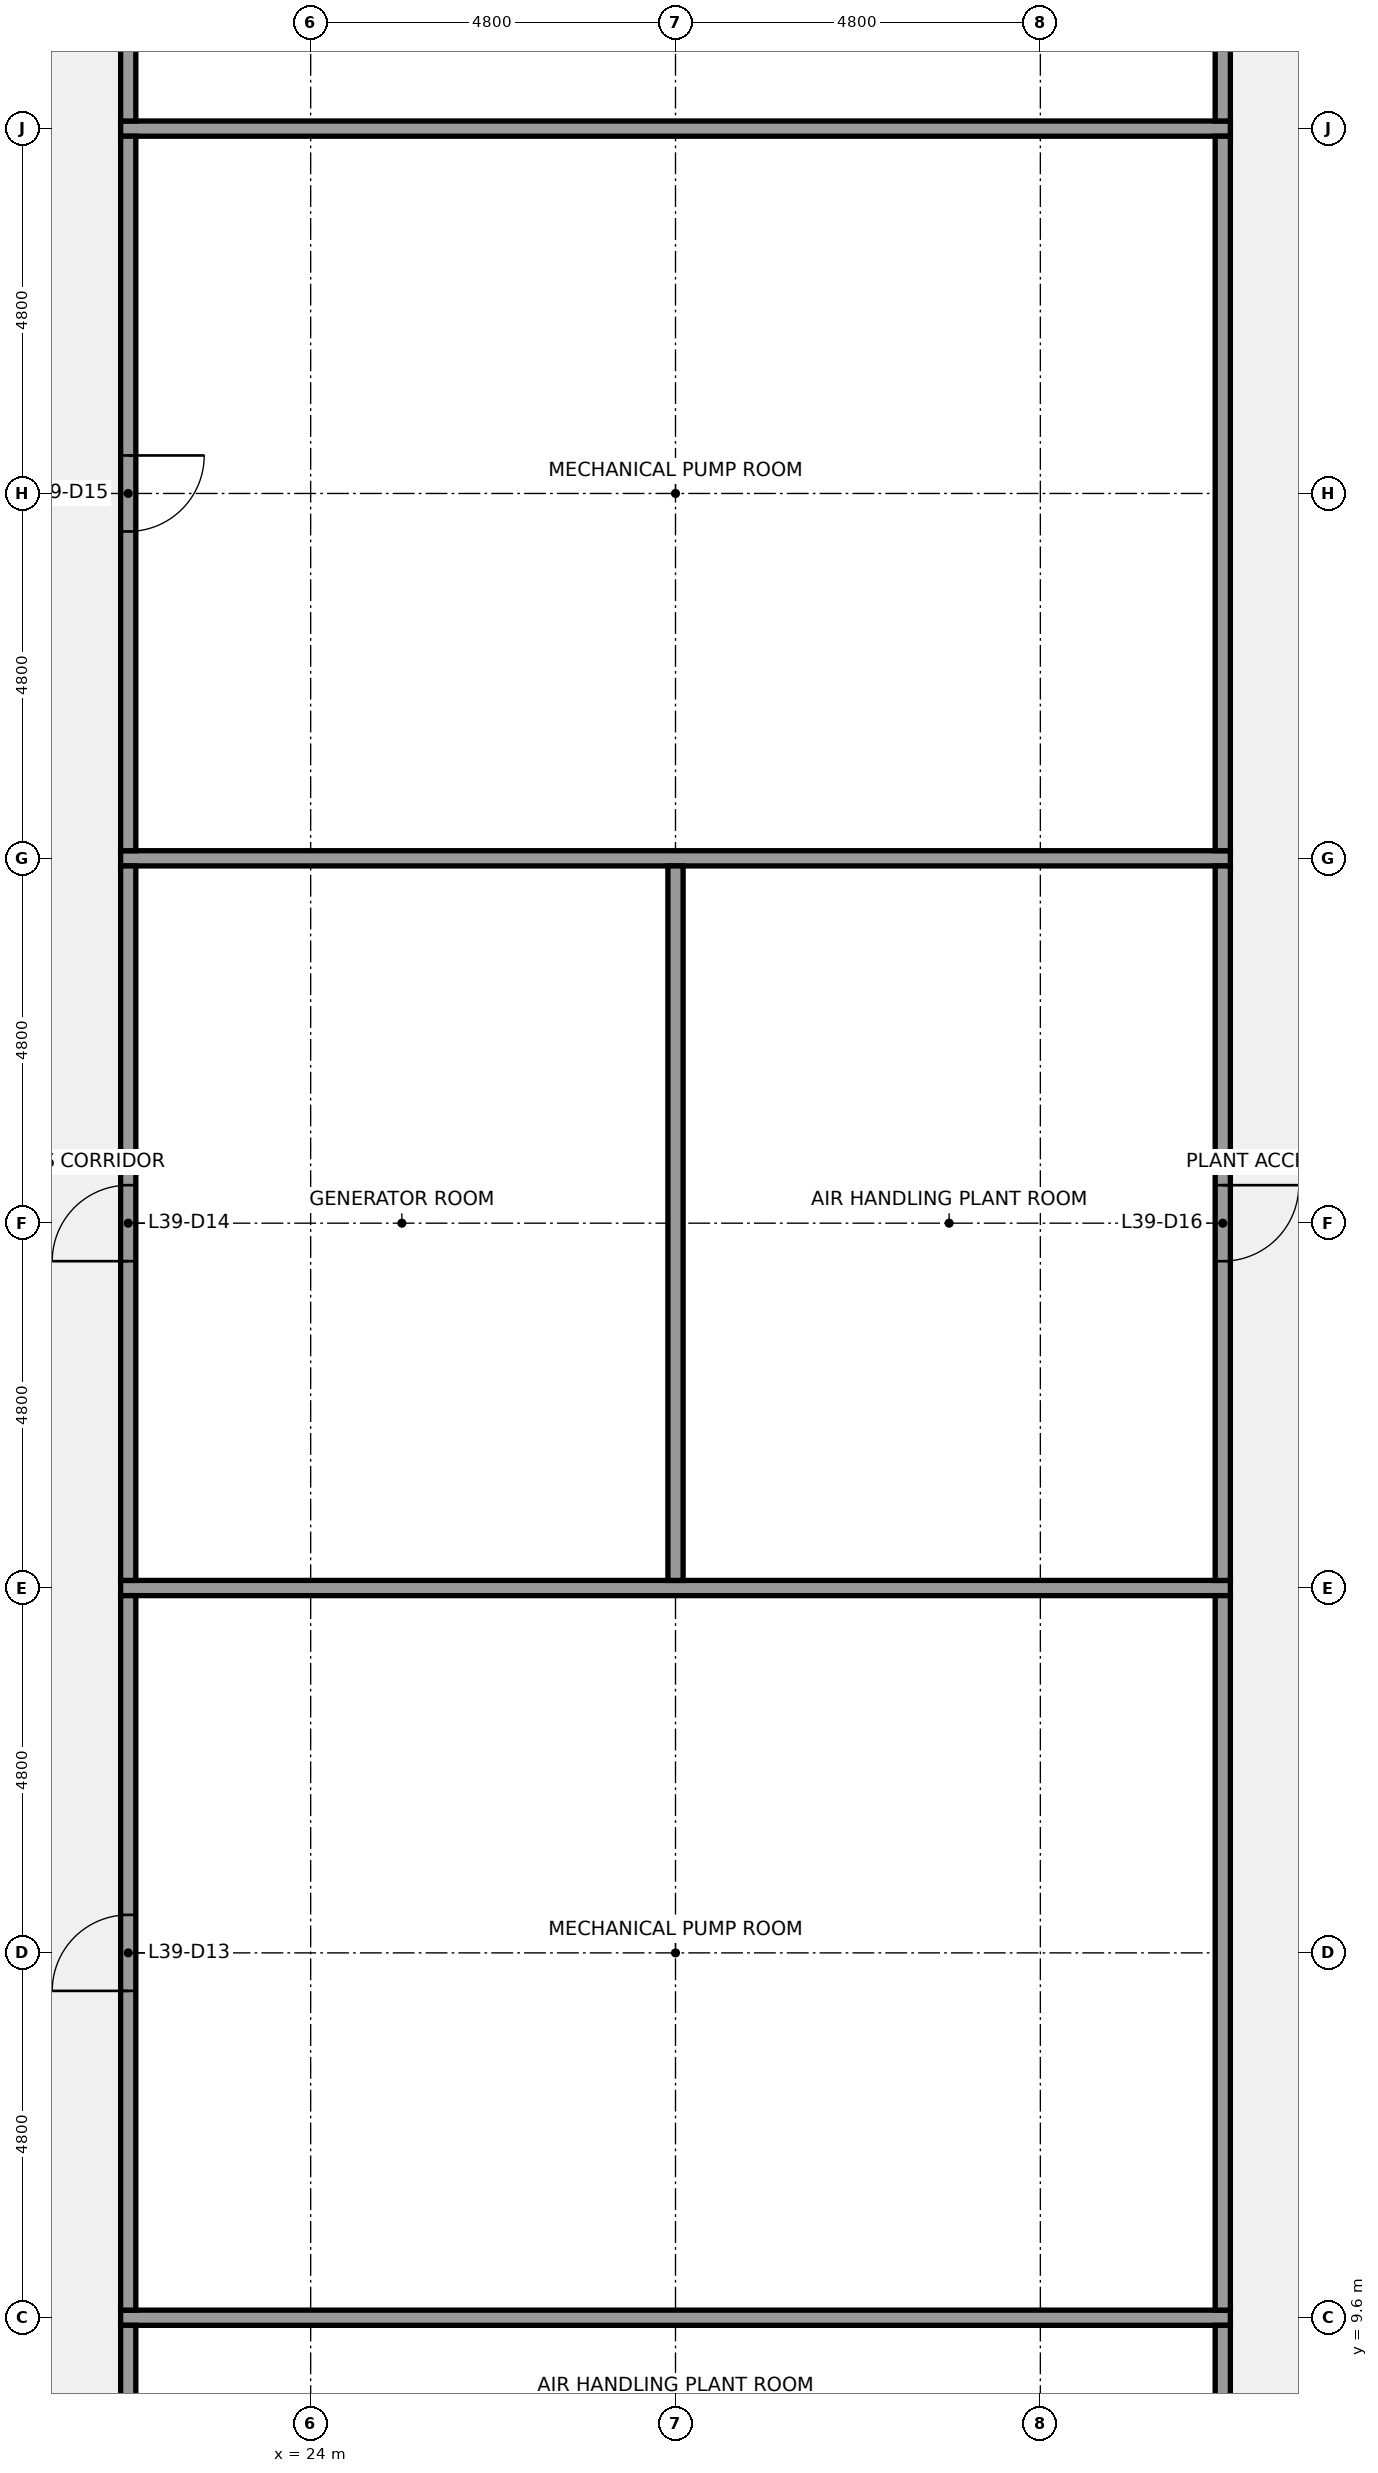
"""IFC4 building model, lengths in metres.
Left out: names, types, materials, properties, quantities, classifications, styles, units other than length and angle.
Written with IfcOpenShell. Run it as: python <this file> out.ifc"""

import sys

from ifc_helpers import new_model, si_unit, direction, frame, frame_2d, origin, place, context, subcontext, project, spatial, rectangle, extrude, element, fill, save


model = new_model("IFC4")
c1 = context("Model", 3, precision=1e-05, world=origin(), true_north=direction((0.0, 1.0)))
c2 = subcontext(c1, "Body", "Model", "MODEL_VIEW")
j1 = project(units=[si_unit("LENGTHUNIT", "METRE"), si_unit("PLANEANGLEUNIT", "RADIAN")], contexts=[c1])
p1 = place(None, origin())
s1 = spatial("IfcSite", under=j1, at=p1, CompositionType="ELEMENT")
p2 = place(p1, origin())
s2 = spatial("IfcBuilding", under=s1, at=p2, CompositionType="ELEMENT")
p3 = place(p2, frame((0.0, 0.0, 176.1)))
s3 = spatial("IfcBuildingStorey", under=s2, at=p3, CompositionType="ELEMENT", Elevation=176.1)
for number, where, z_axis, x_axis in (
    (1, (21.5, 9.6, 0.0), (0.0, 0.0, 1.0), (1.0, 0.0, 0.0)),
    (2, (21.5, 19.2, 0.0), (0.0, 0.0, 1.0), (1.0, 0.0, 0.0)),
    (3, (21.5, 28.8, 0.0), (0.0, 0.0, 1.0), (1.0, 0.0, 0.0)),
    (4, (21.5, 38.4, 0.0), (0.0, 0.0, 1.0), (1.0, 0.0, 0.0)),
):
    element("IfcWall", number, at=place(p3, frame(where, z_axis=z_axis, x_axis=x_axis)), inside=s3, PredefinedType="PARTITIONING", context=c2, shape_type="SweptSolid", body=[
        extrude(rectangle(XDim=14.6, YDim=0.2, at=frame_2d((7.3, 0.0))), origin(), (0.0, 0.0, 1.0), 2.992),
    ])
p4 = place(p3, frame((21.6, 7.3, 0.0), z_axis=(0.0, 0.0, 1.0), x_axis=(0.0, 1.0, 0.0)))
e5 = element("IfcWall", 5, at=p4, inside=s3, PredefinedType="PARTITIONING", context=c2, shape_type="SweptSolid", body=[
    extrude(rectangle(XDim=2.2, YDim=0.2, at=frame_2d((1.1, 0.0))), origin(), (0.0, 0.0, 1.0), 2.992),
])
p5 = place(p3, frame((21.6, 9.7, 0.0), z_axis=(0.0, 0.0, 1.0), x_axis=(0.0, 1.0, 0.0)))
e6 = element("IfcWall", 6, at=p5, inside=s3, PredefinedType="PARTITIONING", context=c2, shape_type="SweptSolid", body=[
    extrude(rectangle(XDim=9.4, YDim=0.2, at=frame_2d((4.7, 0.0))), origin(), (0.0, 0.0, 1.0), 2.992),
])
p6 = place(p5, frame((4.2, 0.0, 0.0)))
e7 = element("IfcOpeningElement", 7, at=p6, cuts=e6, PredefinedType="OPENING", context=c2, shape_type="SweptSolid", body=[
    extrude(rectangle(XDim=1.0, YDim=2.1, at=frame_2d((0.5, 1.05))), frame((0.0, 0.11, 0.0), z_axis=(0.0, -1.0, 0.0), x_axis=(1.0, 0.0, 0.0)), (0.0, 0.0, 1.0), 0.22),
])
p7 = place(p3, frame((21.6, 19.3, 0.0), z_axis=(0.0, 0.0, 1.0), x_axis=(0.0, 1.0, 0.0)))
e8 = element("IfcWall", 8, at=p7, inside=s3, PredefinedType="PARTITIONING", context=c2, shape_type="SweptSolid", body=[
    extrude(rectangle(XDim=9.4, YDim=0.2, at=frame_2d((4.7, 0.0))), origin(), (0.0, 0.0, 1.0), 2.992),
])
p8 = place(p7, frame((4.2, 0.0, 0.0)))
e9 = element("IfcOpeningElement", 9, at=p8, cuts=e8, PredefinedType="OPENING", context=c2, shape_type="SweptSolid", body=[
    extrude(rectangle(XDim=1.0, YDim=2.1, at=frame_2d((0.5, 1.05))), frame((0.0, 0.11, 0.0), z_axis=(0.0, -1.0, 0.0), x_axis=(1.0, 0.0, 0.0)), (0.0, 0.0, 1.0), 0.22),
])
p9 = place(p3, frame((21.6, 28.9, 0.0), z_axis=(0.0, 0.0, 1.0), x_axis=(0.0, 1.0, 0.0)))
e10 = element("IfcWall", 10, at=p9, inside=s3, PredefinedType="PARTITIONING", context=c2, shape_type="SweptSolid", body=[
    extrude(rectangle(XDim=9.4, YDim=0.2, at=frame_2d((4.7, 0.0))), origin(), (0.0, 0.0, 1.0), 2.992),
])
p10 = place(p9, frame((4.2, 0.0, 0.0)))
e11 = element("IfcOpeningElement", 11, at=p10, cuts=e10, PredefinedType="OPENING", context=c2, shape_type="SweptSolid", body=[
    extrude(rectangle(XDim=1.0, YDim=2.1, at=frame_2d((0.5, 1.05))), frame((0.0, 0.11, 0.0), z_axis=(0.0, -1.0, 0.0), x_axis=(1.0, 0.0, 0.0)), (0.0, 0.0, 1.0), 0.22),
])
p11 = place(p3, frame((21.6, 38.5, 0.0), z_axis=(0.0, 0.0, 1.0), x_axis=(0.0, 1.0, 0.0)))
e12 = element("IfcWall", 12, at=p11, inside=s3, PredefinedType="PARTITIONING", context=c2, shape_type="SweptSolid", body=[
    extrude(rectangle(XDim=2.2, YDim=0.2, at=frame_2d((1.1, 0.0))), origin(), (0.0, 0.0, 1.0), 2.992),
])
p12 = place(p3, frame((28.8, 19.3, 0.0), z_axis=(0.0, 0.0, 1.0), x_axis=(0.0, 1.0, 0.0)))
e13 = element("IfcWall", 13, at=p12, inside=s3, PredefinedType="PARTITIONING", context=c2, shape_type="SweptSolid", body=[
    extrude(rectangle(XDim=9.4, YDim=0.2, at=frame_2d((4.7, 0.0))), origin(), (0.0, 0.0, 1.0), 2.992),
])
p13 = place(p3, frame((36.0, 7.3, 0.0), z_axis=(0.0, 0.0, 1.0), x_axis=(0.0, 1.0, 0.0)))
e14 = element("IfcWall", 14, at=p13, inside=s3, PredefinedType="PARTITIONING", context=c2, shape_type="SweptSolid", body=[
    extrude(rectangle(XDim=2.2, YDim=0.2, at=frame_2d((1.1, 0.0))), origin(), (0.0, 0.0, 1.0), 2.992),
])
p14 = place(p3, frame((36.0, 9.7, 0.0), z_axis=(0.0, 0.0, 1.0), x_axis=(0.0, 1.0, 0.0)))
e15 = element("IfcWall", 15, at=p14, inside=s3, PredefinedType="PARTITIONING", context=c2, shape_type="SweptSolid", body=[
    extrude(rectangle(XDim=9.4, YDim=0.2, at=frame_2d((4.7, 0.0))), origin(), (0.0, 0.0, 1.0), 2.992),
])
p15 = place(p3, frame((36.0, 19.3, 0.0), z_axis=(0.0, 0.0, 1.0), x_axis=(0.0, 1.0, 0.0)))
e16 = element("IfcWall", 16, at=p15, inside=s3, PredefinedType="PARTITIONING", context=c2, shape_type="SweptSolid", body=[
    extrude(rectangle(XDim=9.4, YDim=0.2, at=frame_2d((4.7, 0.0))), origin(), (0.0, 0.0, 1.0), 2.992),
])
p16 = place(p15, frame((4.2, 0.0, 0.0)))
e17 = element("IfcOpeningElement", 17, at=p16, cuts=e16, PredefinedType="OPENING", context=c2, shape_type="SweptSolid", body=[
    extrude(rectangle(XDim=1.0, YDim=2.1, at=frame_2d((0.5, 1.05))), frame((0.0, 0.11, 0.0), z_axis=(0.0, -1.0, 0.0), x_axis=(1.0, 0.0, 0.0)), (0.0, 0.0, 1.0), 0.22),
])
p17 = place(p3, frame((36.0, 28.9, 0.0), z_axis=(0.0, 0.0, 1.0), x_axis=(0.0, 1.0, 0.0)))
e18 = element("IfcWall", 18, at=p17, inside=s3, PredefinedType="PARTITIONING", context=c2, shape_type="SweptSolid", body=[
    extrude(rectangle(XDim=9.4, YDim=0.2, at=frame_2d((4.7, 0.0))), origin(), (0.0, 0.0, 1.0), 2.992),
])
p18 = place(p3, frame((36.0, 38.5, 0.0), z_axis=(0.0, 0.0, 1.0), x_axis=(0.0, 1.0, 0.0)))
e19 = element("IfcWall", 19, at=p18, inside=s3, PredefinedType="PARTITIONING", context=c2, shape_type="SweptSolid", body=[
    extrude(rectangle(XDim=2.2, YDim=0.2, at=frame_2d((1.1, 0.0))), origin(), (0.0, 0.0, 1.0), 2.992),
])
p19 = place(p6, origin())
e20 = element("IfcDoor", 20, at=p19, inside=s3, OperationType="SINGLE_SWING_LEFT", PredefinedType="DOOR", context=c2, shape_type="SweptSolid", body=[
    extrude(rectangle(XDim=1.0, YDim=2.1, at=frame_2d((0.5, 1.05))), frame((0.0, 0.025, 0.0), z_axis=(0.0, -1.0, 0.0), x_axis=(1.0, 0.0, 0.0)), (0.0, 0.0, 1.0), 0.05),
])
fill(e7, e20)
p20 = place(p8, origin())
e21 = element("IfcDoor", 21, at=p20, inside=s3, OperationType="SINGLE_SWING_LEFT", PredefinedType="DOOR", context=c2, shape_type="SweptSolid", body=[
    extrude(rectangle(XDim=1.0, YDim=2.1, at=frame_2d((0.5, 1.05))), frame((0.0, 0.025, 0.0), z_axis=(0.0, -1.0, 0.0), x_axis=(1.0, 0.0, 0.0)), (0.0, 0.0, 1.0), 0.05),
])
fill(e9, e21)
p21 = place(p10, origin())
e22 = element("IfcDoor", 22, at=p21, inside=s3, OperationType="SINGLE_SWING_RIGHT", PredefinedType="DOOR", context=c2, shape_type="SweptSolid", body=[
    extrude(rectangle(XDim=1.0, YDim=2.1, at=frame_2d((0.5, 1.05))), frame((0.0, 0.025, 0.0), z_axis=(0.0, -1.0, 0.0), x_axis=(1.0, 0.0, 0.0)), (0.0, 0.0, 1.0), 0.05),
])
fill(e11, e22)
p22 = place(p16, origin())
e23 = element("IfcDoor", 23, at=p22, inside=s3, OperationType="SINGLE_SWING_RIGHT", PredefinedType="DOOR", context=c2, shape_type="SweptSolid", body=[
    extrude(rectangle(XDim=1.0, YDim=2.1, at=frame_2d((0.5, 1.05))), frame((0.0, 0.025, 0.0), z_axis=(0.0, -1.0, 0.0), x_axis=(1.0, 0.0, 0.0)), (0.0, 0.0, 1.0), 0.05),
])
fill(e17, e23)
save(model, sys.argv[1])
